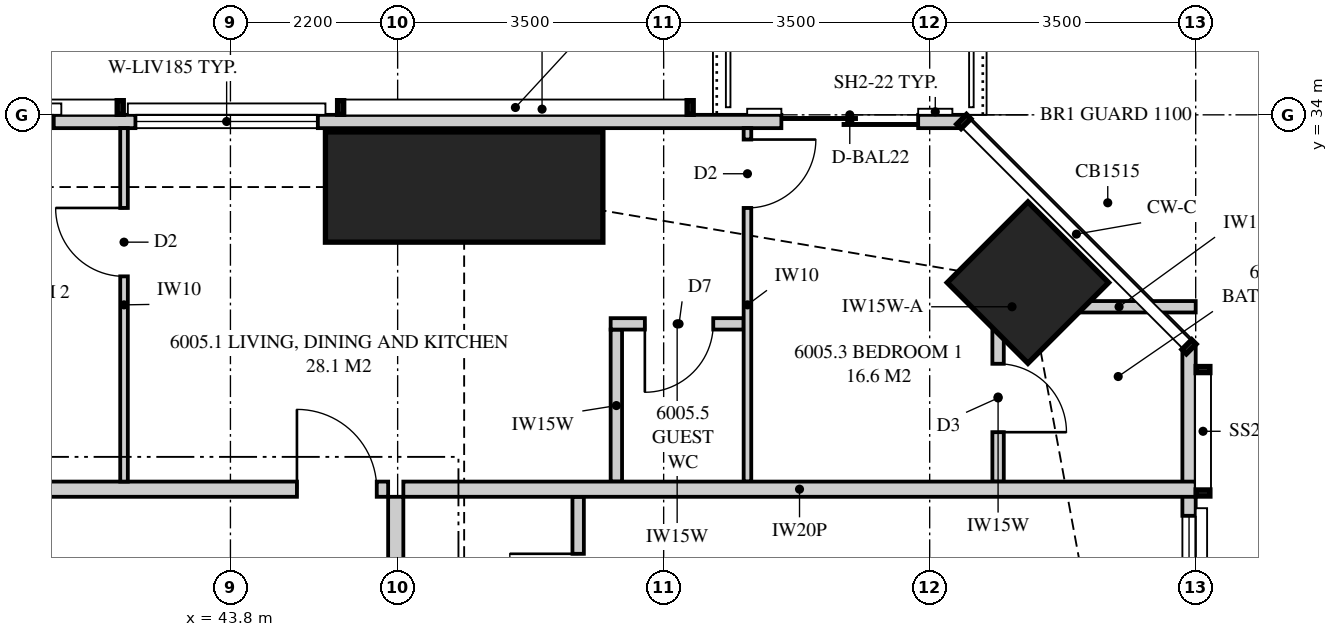
"""IFC4 building model, lengths in metres.
Left out: names, types, materials, properties, quantities, classifications, styles, units other than length and angle.
Written with IfcOpenShell. Run it as: python <this file> out.ifc"""

import sys

from ifc_helpers import new_model, si_unit, direction, frame, frame_2d, origin, origin_2d, place, context, subcontext, project, spatial, polyline, rectangle, hollow_rectangle, outline, extrude, element, fill, save


model = new_model("IFC4")
c1 = context("Model", 3, precision=1e-05, world=origin(), true_north=direction((0.0, 1.0)))
c2 = subcontext(c1, "Body", "Model", "MODEL_VIEW")
j1 = project(units=[si_unit("LENGTHUNIT", "METRE"), si_unit("PLANEANGLEUNIT", "RADIAN")], contexts=[c1])
p1 = place(None, origin())
s1 = spatial("IfcSite", under=j1, at=p1, CompositionType="ELEMENT")
p2 = place(p1, origin())
s2 = spatial("IfcBuilding", under=s1, at=p2, CompositionType="ELEMENT")
p3 = place(p2, frame((0.0, 0.0, 221.45)))
s3 = spatial("IfcBuildingStorey", under=s2, at=p3, CompositionType="ELEMENT", Elevation=221.45)
p4 = place(p3, frame((54.293, 31.793, 0.0), z_axis=(0.0, 0.0, 1.0), x_axis=(-0.707106781187, -0.707106781187, 0.0)))
e1 = element("IfcColumn", 1, at=p4, inside=s3, PredefinedType="COLUMN", context=c2, shape_type="SweptSolid", body=[
    extrude(hollow_rectangle(XDim=1.5, YDim=1.5, WallThickness=0.125, at=origin_2d()), origin(), (0.0, 0.0, 1.0), 3.5),
])
p5 = place(p3, frame((46.875, 33.05, 0.0), z_axis=(0.0, 0.0, 1.0), x_axis=(0.0, 1.0, 0.0)))
e2 = element("IfcColumn", 2, at=p5, inside=s3, PredefinedType="COLUMN", context=c2, shape_type="SweptSolid", body=[
    extrude(rectangle(XDim=1.45, YDim=3.65, at=origin_2d()), origin(), (0.0, 0.0, 1.0), 3.5),
])
p6 = place(p3, frame((56.413, 20.35, 0.0), z_axis=(0.0, 0.0, 1.0), x_axis=(0.0, 1.0, 0.0)))
e3 = element("IfcWall", 3, at=p6, inside=s3, PredefinedType="SOLIDWALL", context=c2, shape_type="SweptSolid", body=[
    extrude(outline(polyline([(0.0, 0.0), (10.599, 0.0), (10.599, 3.26), (4.858, 3.26), (4.858, 2.3), (4.793, 2.3), (4.793, 3.26), (4.65, 3.26), (4.65, 2.3), (0.0, 2.3), (0.0, 0.0)])), frame((0.0, 0.087, 0.0), z_axis=(0.0, -1.0, 0.0), x_axis=(1.0, 0.0, 0.0)), (0.0, 0.0, 1.0), 0.175),
])
p7 = place(p6, frame((6.575, 0.0, 0.4)))
e4 = element("IfcOpeningElement", 4, at=p7, cuts=e3, PredefinedType="OPENING", context=c2, shape_type="SweptSolid", body=[
    extrude(rectangle(XDim=1.8, YDim=1.85, at=frame_2d((0.9, 0.925))), frame((0.0, 0.097, 0.0), z_axis=(0.0, -1.0, 0.0), x_axis=(1.0, 0.0, 0.0)), (0.0, 0.0, 1.0), 0.195),
])
p8 = place(p3, frame((53.449, 33.913, 0.0), z_axis=(0.0, 0.0, 1.0), x_axis=(-1.0, 0.0, 0.0)))
e5 = element("IfcWall", 5, at=p8, inside=s3, PredefinedType="SOLIDWALL", context=c2, shape_type="SweptSolid", body=[
    extrude(outline(polyline([(0.0, 0.0), (33.597, 0.0), (33.597, 3.26), (26.039, 3.26), (26.039, 2.3), (25.955, 2.3), (25.955, 3.26), (25.824, 3.26), (25.824, 2.3), (6.574, 2.3), (6.574, 3.26), (6.442, 3.26), (6.442, 2.3), (6.359, 2.3), (6.359, 3.26), (0.0, 3.26), (0.0, 0.0)])), frame((0.0, 0.087, 0.0), z_axis=(0.0, -1.0, 0.0), x_axis=(1.0, 0.0, 0.0)), (0.0, 0.0, 1.0), 0.175),
])
p9 = place(p8, frame((0.6, 0.0, 0.0)))
e6 = element("IfcOpeningElement", 6, at=p9, cuts=e5, PredefinedType="OPENING", context=c2, shape_type="SweptSolid", body=[
    extrude(rectangle(XDim=1.8, YDim=2.25, at=frame_2d((0.9, 1.125))), frame((0.0, 0.097, 0.0), z_axis=(0.0, -1.0, 0.0), x_axis=(1.0, 0.0, 0.0)), (0.0, 0.0, 1.0), 0.195),
])
p10 = place(p8, frame((8.499, 0.0, 0.4)))
e7 = element("IfcOpeningElement", 7, at=p10, cuts=e5, PredefinedType="OPENING", context=c2, shape_type="SweptSolid", body=[
    extrude(rectangle(XDim=2.4, YDim=1.85, at=frame_2d((1.2, 0.925))), frame((0.0, 0.097, 0.0), z_axis=(0.0, -1.0, 0.0), x_axis=(1.0, 0.0, 0.0)), (0.0, 0.0, 1.0), 0.195),
])
p11 = place(p8, frame((11.974, 0.0, 0.4)))
e8 = element("IfcOpeningElement", 8, at=p11, cuts=e5, PredefinedType="OPENING", context=c2, shape_type="SweptSolid", body=[
    extrude(rectangle(XDim=1.8, YDim=1.85, at=frame_2d((0.9, 0.925))), frame((0.0, 0.097, 0.0), z_axis=(0.0, -1.0, 0.0), x_axis=(1.0, 0.0, 0.0)), (0.0, 0.0, 1.0), 0.195),
])
p12 = place(p8, frame((18.124, 0.0, 0.4)))
e9 = element("IfcOpeningElement", 9, at=p12, cuts=e5, PredefinedType="OPENING", context=c2, shape_type="SweptSolid", body=[
    extrude(rectangle(XDim=1.8, YDim=1.85, at=frame_2d((0.9, 0.925))), frame((0.0, 0.097, 0.0), z_axis=(0.0, -1.0, 0.0), x_axis=(1.0, 0.0, 0.0)), (0.0, 0.0, 1.0), 0.195),
])
p13 = place(p8, frame((21.249, 0.0, 0.4)))
e10 = element("IfcOpeningElement", 10, at=p13, cuts=e5, PredefinedType="OPENING", context=c2, shape_type="SweptSolid", body=[
    extrude(rectangle(XDim=1.8, YDim=1.85, at=frame_2d((0.9, 0.925))), frame((0.0, 0.097, 0.0), z_axis=(0.0, -1.0, 0.0), x_axis=(1.0, 0.0, 0.0)), (0.0, 0.0, 1.0), 0.195),
])
p14 = place(p8, frame((27.76, 0.0, 0.4)))
e11 = element("IfcOpeningElement", 11, at=p14, cuts=e5, PredefinedType="OPENING", context=c2, shape_type="SweptSolid", body=[
    extrude(rectangle(XDim=2.4, YDim=1.85, at=frame_2d((1.2, 0.925))), frame((0.0, 0.097, 0.0), z_axis=(0.0, -1.0, 0.0), x_axis=(1.0, 0.0, 0.0)), (0.0, 0.0, 1.0), 0.195),
])
p15 = place(p3, frame((38.8, 29.075, 0.0), z_axis=(0.0, 0.0, 1.0), x_axis=(1.0, 0.0, 0.0)))
e12 = element("IfcWall", 12, at=p15, inside=s3, PredefinedType="PARTITIONING", context=c2, shape_type="SweptSolid", body=[
    extrude(outline(polyline([(0.0, 0.0), (7.075, 0.0), (7.075, 3.26), (7.075, 2.66), (6.765, 2.66), (6.765, 3.26), (0.0, 3.26), (0.0, 0.0)])), frame((0.0, 0.1, 0.0), z_axis=(0.0, -1.0, 0.0), x_axis=(1.0, 0.0, 0.0)), (0.0, 0.0, 1.0), 0.2),
])
p16 = place(p15, frame((5.875, 0.0, 0.0)))
e13 = element("IfcOpeningElement", 13, at=p16, cuts=e12, PredefinedType="OPENING", context=c2, shape_type="SweptSolid", body=[
    extrude(rectangle(XDim=1.05, YDim=2.2, at=frame_2d((0.525, 1.1))), frame((0.0, 0.11, 0.0), z_axis=(0.0, -1.0, 0.0), x_axis=(1.0, 0.0, 0.0)), (0.0, 0.0, 1.0), 0.22),
])
p17 = place(p3, frame((53.975, 31.475, 0.0), z_axis=(0.0, 0.0, 1.0), x_axis=(1.0, 0.0, 0.0)))
e14 = element("IfcWall", 14, at=p17, inside=s3, PredefinedType="PLUMBINGWALL", context=c2, shape_type="SweptSolid", body=[
    extrude(rectangle(XDim=0.217, YDim=0.15, at=frame_2d((0.108, 0.0))), origin(), (0.0, 0.0, 1.0), 2.3),
])
p18 = place(p3, frame((54.483, 31.475, 0.0), z_axis=(0.0, 0.0, 1.0), x_axis=(1.0, 0.0, 0.0)))
e15 = element("IfcWall", 15, at=p18, inside=s3, PredefinedType="PLUMBINGWALL", context=c2, shape_type="SweptSolid", body=[
    extrude(outline(polyline([(0.768, 3.26), (0.768, 2.3), (0.407, 2.3), (0.396, 2.239), (0.0, 1.15), (0.396, 0.061), (0.407, 0.0), (2.017, 0.0), (2.017, 3.26), (0.768, 3.26)])), frame((0.0, 0.075, 0.0), z_axis=(0.0, -1.0, 0.0), x_axis=(1.0, 0.0, 0.0)), (0.0, 0.0, 1.0), 0.15),
])
p19 = place(p3, frame((53.9, 31.4, 0.0), z_axis=(0.0, 0.0, 1.0), x_axis=(0.0, -1.0, 0.0)))
e16 = element("IfcWall", 16, at=p19, inside=s3, PredefinedType="PLUMBINGWALL", context=c2, shape_type="SweptSolid", body=[
    extrude(outline(polyline([(0.0, 0.0), (2.225, 0.0), (2.225, 3.26), (2.225, 2.3), (0.438, 2.3), (0.0, 2.3), (0.0, 3.26), (0.0, 0.0)])), frame((0.0, 0.075, 0.0), z_axis=(0.0, -1.0, 0.0), x_axis=(1.0, 0.0, 0.0)), (0.0, 0.0, 1.0), 0.15),
])
p20 = place(p19, frame((0.675, 0.0, 0.0)))
e17 = element("IfcOpeningElement", 17, at=p20, cuts=e16, PredefinedType="OPENING", context=c2, shape_type="SweptSolid", body=[
    extrude(rectangle(XDim=0.9, YDim=2.1, at=frame_2d((0.45, 1.05))), frame((0.0, 0.085, 0.0), z_axis=(0.0, -1.0, 0.0), x_axis=(1.0, 0.0, 0.0)), (0.0, 0.0, 1.0), 0.17),
])
p21 = place(p3, frame((50.603, 33.825, 0.0), z_axis=(0.0, 0.0, 1.0), x_axis=(0.0, -1.0, 0.0)))
e18 = element("IfcWall", 18, at=p21, inside=s3, PredefinedType="PARTITIONING", context=c2, shape_type="SweptSolid", body=[
    extrude(outline(polyline([(0.0, 0.0), (4.65, 0.0), (4.65, 3.26), (2.279, 3.26), (2.279, 2.3), (0.534, 2.3), (0.534, 3.26), (0.0, 3.26), (0.0, 0.0)])), frame((0.0, 0.05, 0.0), z_axis=(0.0, -1.0, 0.0), x_axis=(1.0, 0.0, 0.0)), (0.0, 0.0, 1.0), 0.1),
])
p22 = place(p21, frame((0.15, 0.0, 0.0)))
e19 = element("IfcOpeningElement", 19, at=p22, cuts=e18, PredefinedType="OPENING", context=c2, shape_type="SweptSolid", body=[
    extrude(rectangle(XDim=0.9, YDim=2.1, at=frame_2d((0.45, 1.05))), frame((0.0, 0.06, 0.0), z_axis=(0.0, -1.0, 0.0), x_axis=(1.0, 0.0, 0.0)), (0.0, 0.0, 1.0), 0.12),
])
p23 = place(p3, frame((42.4, 33.825, 0.0), z_axis=(0.0, 0.0, 1.0), x_axis=(0.0, -1.0, 0.0)))
e20 = element("IfcWall", 20, at=p23, inside=s3, PredefinedType="PARTITIONING", context=c2, shape_type="SweptSolid", body=[
    extrude(outline(polyline([(0.0, 0.0), (4.65, 0.0), (4.65, 3.26), (1.635, 3.26), (1.635, 2.3), (0.0, 2.3), (0.0, 3.26), (0.0, 0.0)])), frame((0.0, 0.05, 0.0), z_axis=(0.0, -1.0, 0.0), x_axis=(1.0, 0.0, 0.0)), (0.0, 0.0, 1.0), 0.1),
])
p24 = place(p23, frame((1.05, 0.0, 0.0)))
e21 = element("IfcOpeningElement", 21, at=p24, cuts=e20, PredefinedType="OPENING", context=c2, shape_type="SweptSolid", body=[
    extrude(rectangle(XDim=0.9, YDim=2.1, at=frame_2d((0.45, 1.05))), frame((0.0, 0.06, 0.0), z_axis=(0.0, -1.0, 0.0), x_axis=(1.0, 0.0, 0.0)), (0.0, 0.0, 1.0), 0.12),
])
p25 = place(p3, frame((46.075, 29.075, 0.0), z_axis=(0.0, 0.0, 1.0), x_axis=(1.0, 0.0, 0.0)))
e22 = element("IfcWall", 22, at=p25, inside=s3, PredefinedType="PARTITIONING", context=c2, shape_type="SweptSolid", body=[
    extrude(outline(polyline([(0.0, 0.0), (10.425, 0.0), (10.425, 3.26), (9.646, 3.26), (9.646, 2.3), (7.795, 2.3), (7.795, 3.26), (2.11, 3.26), (2.11, 2.66), (0.0, 2.66), (0.0, 3.26), (0.0, 0.0)])), frame((0.0, 0.1, 0.0), z_axis=(0.0, -1.0, 0.0), x_axis=(1.0, 0.0, 0.0)), (0.0, 0.0, 1.0), 0.2),
])
p26 = place(p3, frame((45.975, 25.0, 0.0), z_axis=(0.0, 0.0, 1.0), x_axis=(0.0, 1.0, 0.0)))
e23 = element("IfcWall", 23, at=p26, inside=s3, PredefinedType="PARTITIONING", context=c2, shape_type="SweptSolid", body=[
    extrude(rectangle(XDim=3.975, YDim=0.2, at=frame_2d((1.988, 0.0))), origin(), (0.0, 0.0, 1.0), 2.66),
])
p27 = place(p26, frame((0.212, 0.0, 0.0)))
e24 = element("IfcOpeningElement", 24, at=p27, cuts=e23, PredefinedType="OPENING", context=c2, shape_type="SweptSolid", body=[
    extrude(rectangle(XDim=1.05, YDim=2.2, at=frame_2d((0.525, 1.1))), frame((0.0, 0.11, 0.0), z_axis=(0.0, -1.0, 0.0), x_axis=(1.0, 0.0, 0.0)), (0.0, 0.0, 1.0), 0.22),
])
p28 = place(p3, frame((48.375, 26.55, 0.0), z_axis=(0.0, 0.0, 1.0), x_axis=(0.0, 1.0, 0.0)))
e25 = element("IfcWall", 25, at=p28, inside=s3, PredefinedType="PLUMBINGWALL", context=c2, shape_type="SweptSolid", body=[
    extrude(rectangle(XDim=2.425, YDim=0.15, at=frame_2d((1.212, 0.0))), origin(), (0.0, 0.0, 1.0), 3.26),
])
p29 = place(p28, frame((0.775, 0.0, 0.0)))
e26 = element("IfcOpeningElement", 26, at=p29, cuts=e25, PredefinedType="OPENING", context=c2, shape_type="SweptSolid", body=[
    extrude(rectangle(XDim=0.9, YDim=2.1, at=frame_2d((0.45, 1.05))), frame((0.0, 0.085, 0.0), z_axis=(0.0, -1.0, 0.0), x_axis=(1.0, 0.0, 0.0)), (0.0, 0.0, 1.0), 0.17),
])
p30 = place(p3, frame((50.552, 31.25, 0.0), z_axis=(0.0, 0.0, 1.0), x_axis=(-1.0, 0.0, 0.0)))
e27 = element("IfcWall", 27, at=p30, inside=s3, PredefinedType="PLUMBINGWALL", context=c2, shape_type="SweptSolid", body=[
    extrude(rectangle(XDim=1.75, YDim=0.15, at=frame_2d((0.875, 0.0))), origin(), (0.0, 0.0, 1.0), 3.26),
])
p31 = place(p30, frame((0.4, 0.0, 0.0)))
e28 = element("IfcOpeningElement", 28, at=p31, cuts=e27, PredefinedType="OPENING", context=c2, shape_type="SweptSolid", body=[
    extrude(rectangle(XDim=0.9, YDim=2.1, at=frame_2d((0.45, 1.05))), frame((0.0, 0.085, 0.0), z_axis=(0.0, -1.0, 0.0), x_axis=(1.0, 0.0, 0.0)), (0.0, 0.0, 1.0), 0.17),
])
p32 = place(p3, frame((48.877, 29.175, 0.0), z_axis=(0.0, 0.0, 1.0), x_axis=(0.0, 1.0, 0.0)))
e29 = element("IfcWall", 29, at=p32, inside=s3, PredefinedType="PLUMBINGWALL", context=c2, shape_type="SweptSolid", body=[
    extrude(rectangle(XDim=2.0, YDim=0.15, at=frame_2d((1.0, 0.0))), origin(), (0.0, 0.0, 1.0), 3.26),
])
p33 = place(p7, origin())
e30 = element("IfcWindow", 30, at=p33, inside=s3, PartitioningType="SINGLE_PANEL", PredefinedType="WINDOW", context=c2, shape_type="SweptSolid", body=[
    extrude(rectangle(XDim=1.8, YDim=1.85, at=frame_2d((0.9, 0.925))), frame((0.0, 0.03, 0.0), z_axis=(0.0, -1.0, 0.0), x_axis=(1.0, 0.0, 0.0)), (0.0, 0.0, 1.0), 0.06),
])
fill(e4, e30)
p34 = place(p9, origin())
e31 = element("IfcDoor", 31, at=p34, inside=s3, OperationType="SLIDING_TO_LEFT", PredefinedType="DOOR", context=c2, shape_type="SweptSolid", body=[
    extrude(rectangle(XDim=1.8, YDim=2.25, at=frame_2d((0.9, 1.125))), frame((0.0, 0.025, 0.0), z_axis=(0.0, -1.0, 0.0), x_axis=(1.0, 0.0, 0.0)), (0.0, 0.0, 1.0), 0.05),
])
fill(e6, e31)
p35 = place(p10, origin())
e32 = element("IfcWindow", 32, at=p35, inside=s3, PartitioningType="SINGLE_PANEL", PredefinedType="WINDOW", context=c2, shape_type="SweptSolid", body=[
    extrude(rectangle(XDim=2.4, YDim=1.85, at=frame_2d((1.2, 0.925))), frame((0.0, 0.03, 0.0), z_axis=(0.0, -1.0, 0.0), x_axis=(1.0, 0.0, 0.0)), (0.0, 0.0, 1.0), 0.06),
])
fill(e7, e32)
p36 = place(p11, origin())
e33 = element("IfcWindow", 33, at=p36, inside=s3, PartitioningType="SINGLE_PANEL", PredefinedType="WINDOW", context=c2, shape_type="SweptSolid", body=[
    extrude(rectangle(XDim=1.8, YDim=1.85, at=frame_2d((0.9, 0.925))), frame((0.0, 0.03, 0.0), z_axis=(0.0, -1.0, 0.0), x_axis=(1.0, 0.0, 0.0)), (0.0, 0.0, 1.0), 0.06),
])
fill(e8, e33)
p37 = place(p16, origin())
e34 = element("IfcDoor", 34, at=p37, inside=s3, OperationType="SINGLE_SWING_LEFT", PredefinedType="DOOR", context=c2, shape_type="SweptSolid", body=[
    extrude(rectangle(XDim=1.05, YDim=2.2, at=frame_2d((0.525, 1.1))), frame((0.0, 0.025, 0.0), z_axis=(0.0, -1.0, 0.0), x_axis=(1.0, 0.0, 0.0)), (0.0, 0.0, 1.0), 0.05),
])
fill(e13, e34)
p38 = place(p20, origin())
e35 = element("IfcDoor", 35, at=p38, inside=s3, OperationType="SINGLE_SWING_RIGHT", PredefinedType="DOOR", context=c2, shape_type="SweptSolid", body=[
    extrude(rectangle(XDim=0.9, YDim=2.1, at=frame_2d((0.45, 1.05))), frame((0.0, 0.025, 0.0), z_axis=(0.0, -1.0, 0.0), x_axis=(1.0, 0.0, 0.0)), (0.0, 0.0, 1.0), 0.05),
])
fill(e17, e35)
p39 = place(p22, origin())
e36 = element("IfcDoor", 36, at=p39, inside=s3, OperationType="SINGLE_SWING_LEFT", PredefinedType="DOOR", context=c2, shape_type="SweptSolid", body=[
    extrude(rectangle(XDim=0.9, YDim=2.1, at=frame_2d((0.45, 1.05))), frame((0.0, 0.025, 0.0), z_axis=(0.0, -1.0, 0.0), x_axis=(1.0, 0.0, 0.0)), (0.0, 0.0, 1.0), 0.05),
])
fill(e19, e36)
p40 = place(p24, frame((0.9, 0.0, 0.0), z_axis=(0.0, 0.0, 1.0), x_axis=(-1.0, 0.0, 0.0)))
e37 = element("IfcDoor", 37, at=p40, inside=s3, OperationType="SINGLE_SWING_RIGHT", PredefinedType="DOOR", context=c2, shape_type="SweptSolid", body=[
    extrude(rectangle(XDim=0.9, YDim=2.1, at=frame_2d((0.45, 1.05))), frame((0.0, 0.025, 0.0), z_axis=(0.0, -1.0, 0.0), x_axis=(1.0, 0.0, 0.0)), (0.0, 0.0, 1.0), 0.05),
])
fill(e21, e37)
p41 = place(p29, origin())
e38 = element("IfcDoor", 38, at=p41, inside=s3, OperationType="SINGLE_SWING_RIGHT", PredefinedType="DOOR", context=c2, shape_type="SweptSolid", body=[
    extrude(rectangle(XDim=0.9, YDim=2.1, at=frame_2d((0.45, 1.05))), frame((0.0, 0.025, 0.0), z_axis=(0.0, -1.0, 0.0), x_axis=(1.0, 0.0, 0.0)), (0.0, 0.0, 1.0), 0.05),
])
fill(e26, e38)
p42 = place(p31, origin())
e39 = element("IfcDoor", 39, at=p42, inside=s3, OperationType="SINGLE_SWING_RIGHT", PredefinedType="DOOR", context=c2, shape_type="SweptSolid", body=[
    extrude(rectangle(XDim=0.9, YDim=2.1, at=frame_2d((0.45, 1.05))), frame((0.0, 0.025, 0.0), z_axis=(0.0, -1.0, 0.0), x_axis=(1.0, 0.0, 0.0)), (0.0, 0.0, 1.0), 0.05),
])
fill(e28, e39)
save(model, sys.argv[1])
